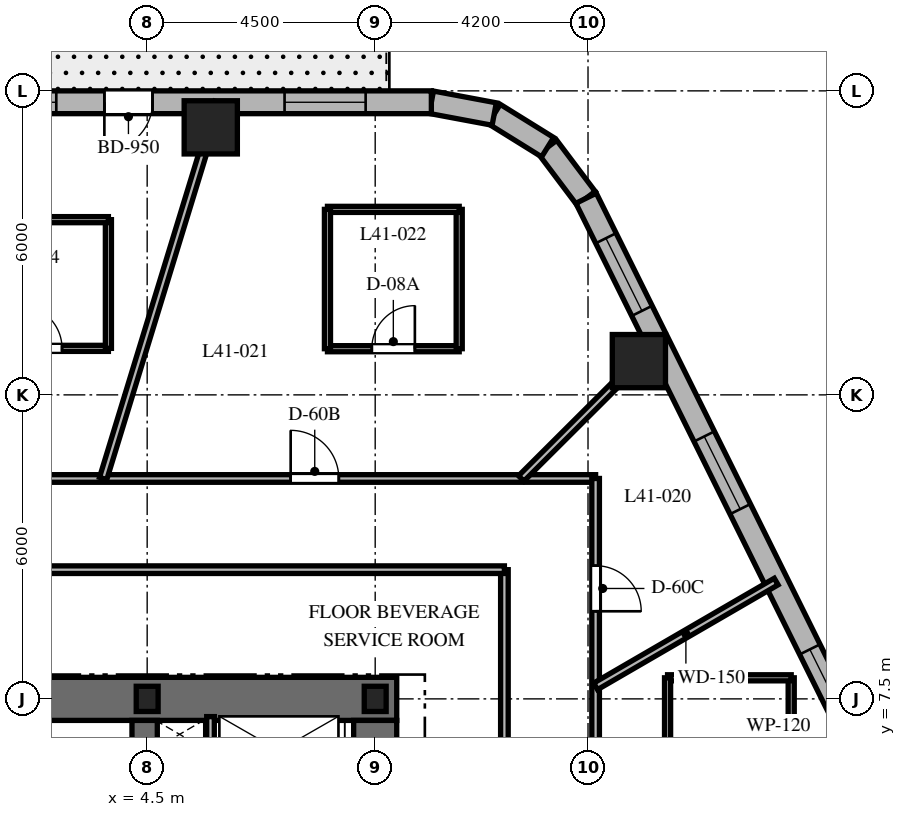
"""IFC4 building model, lengths in metres.
Left out: names, types, materials, properties, quantities, classifications, styles, units other than length and angle.
Written with IfcOpenShell. Run it as: python <this file> out.ifc"""

import sys

from ifc_helpers import new_model, si_unit, direction, frame, frame_2d, origin, origin_2d, place, context, subcontext, project, spatial, rectangle, i_section, extrude, element, fill, save


model = new_model("IFC4")
c1 = context("Model", 3, precision=1e-05, world=origin(), true_north=direction((0.0, 1.0)))
c2 = subcontext(c1, "Body", "Model", "MODEL_VIEW")
j1 = project(units=[si_unit("LENGTHUNIT", "METRE"), si_unit("PLANEANGLEUNIT", "RADIAN")], contexts=[c1])
p1 = place(None, origin())
s1 = spatial("IfcSite", under=j1, at=p1, CompositionType="ELEMENT")
p2 = place(p1, origin())
s2 = spatial("IfcBuilding", under=s1, at=p2, CompositionType="ELEMENT")
p3 = place(p2, frame((0.0, 0.0, 166.5)))
s3 = spatial("IfcBuildingStorey", under=s2, at=p3, CompositionType="ELEMENT", Elevation=166.5)
p4 = place(p3, frame((1.85, 7.5, 0.0), z_axis=(0.0, 0.0, 1.0), x_axis=(1.0, 0.0, 0.0)))
e1 = element("IfcWall", 1, at=p4, inside=s3, PredefinedType="SHEAR", context=c2, shape_type="SweptSolid", body=[
    extrude(rectangle(XDim=7.575, YDim=0.85, at=frame_2d((3.788, 0.0))), origin(), (0.0, 0.0, 1.0), 3.7),
])
p5 = place(p3, frame((9.0, -7.075, 0.0), z_axis=(0.0, 0.0, 1.0), x_axis=(0.0, 1.0, 0.0)))
e2 = element("IfcWall", 2, at=p5, inside=s3, PredefinedType="SHEAR", context=c2, shape_type="SweptSolid", body=[
    extrude(rectangle(XDim=14.15, YDim=0.85, at=frame_2d((7.075, 0.0))), origin(), (0.0, 0.0, 1.0), 3.7),
])
p6 = place(p5, frame((10.2, 0.0, 0.0)))
e3 = element("IfcOpeningElement", 3, at=p6, cuts=e2, PredefinedType="OPENING", context=c2, shape_type="SweptSolid", body=[
    extrude(rectangle(XDim=1.05, YDim=2.15, at=frame_2d((0.525, 1.075))), frame((0.0, 0.435, 0.0), z_axis=(0.0, -1.0, 0.0), x_axis=(1.0, 0.0, 0.0)), (0.0, 0.0, 1.0), 0.87),
])
p7 = place(p3, frame((4.45, 2.25, 0.0), z_axis=(0.0, 0.0, 1.0), x_axis=(0.0, 1.0, 0.0)))
e4 = element("IfcWall", 4, at=p7, inside=s3, PredefinedType="SHEAR", context=c2, shape_type="SweptSolid", body=[
    extrude(rectangle(XDim=4.825, YDim=0.5, at=frame_2d((2.413, 0.0))), origin(), (0.0, 0.0, 1.0), 3.7),
])
for number, where, z_axis, x_axis in (
    (5, (9.0, 7.5, 0.0), (0.0, 0.0, 1.0), (1.0, 0.0, 0.0)),
    (6, (4.5, 7.5, 0.0), (0.0, 0.0, 1.0), (1.0, 0.0, 0.0)),
):
    element("IfcColumn", number, at=place(p3, frame(where, z_axis=z_axis, x_axis=x_axis)), inside=s3, PredefinedType="COLUMN", context=c2, shape_type="SweptSolid", body=[
        extrude(i_section(OverallWidth=0.432, OverallDepth=0.498, WebThickness=0.056, FlangeThickness=0.089, at=origin_2d()), origin(), (0.0, 0.0, 1.0), 3.7),
    ])
for number, where, z_axis, x_axis in (
    (7, (14.204, 14.166, 0.0), (0.0, 0.0, 1.0), (1.0, 0.0, 0.0)),
    (8, (5.755, 18.78, 0.0), (0.0, 0.0, 1.0), (1.0, 0.0, 0.0)),
):
    element("IfcColumn", number, at=place(p3, frame(where, z_axis=z_axis, x_axis=x_axis)), inside=s3, PredefinedType="COLUMN", context=c2, shape_type="SweptSolid", body=[
        extrude(rectangle(XDim=1.05, YDim=1.05, at=origin_2d()), origin(), (0.0, 0.0, 1.0), 3.7),
    ])
p8 = place(p3, frame((13.162, 17.381, 0.0), z_axis=(0.0, 0.0, 1.0), x_axis=(-0.601515770517, 0.798860925205, 0.0)))
e9 = element("IfcWall", 9, at=p8, inside=s3, PredefinedType="SOLIDWALL", context=c2, shape_type="SweptSolid", body=[
    extrude(rectangle(XDim=1.262, YDim=0.45, at=frame_2d((0.631, 0.0))), origin(), (0.0, 0.0, 1.0), 3.38),
])
p9 = place(p3, frame((12.403, 18.389, 0.0), z_axis=(0.0, 0.0, 1.0), x_axis=(-0.849795170926, 0.527113049991, 0.0)))
e10 = element("IfcWall", 10, at=p9, inside=s3, PredefinedType="SOLIDWALL", context=c2, shape_type="SweptSolid", body=[
    extrude(rectangle(XDim=1.241, YDim=0.45, at=frame_2d((0.62, 0.0))), origin(), (0.0, 0.0, 1.0), 3.38),
])
p10 = place(p3, frame((11.349, 19.043, 0.0), z_axis=(0.0, 0.0, 1.0), x_axis=(-0.982931267051, 0.183973161772, 0.0)))
e11 = element("IfcWall", 11, at=p10, inside=s3, PredefinedType="SOLIDWALL", context=c2, shape_type="SweptSolid", body=[
    extrude(rectangle(XDim=1.262, YDim=0.45, at=frame_2d((0.631, 0.0))), origin(), (0.0, 0.0, 1.0), 3.38),
])
p11 = place(p3, frame((20.618, 2.344, 0.0), z_axis=(0.0, 0.0, 1.0), x_axis=(-0.444243691097, 0.895905990002, 0.0)))
e12 = element("IfcWall", 12, at=p11, inside=s3, PredefinedType="SOLIDWALL", context=c2, shape_type="SweptSolid", body=[
    extrude(rectangle(XDim=16.784, YDim=0.45, at=frame_2d((8.392, 0.0))), origin(), (0.0, 0.0, 1.0), 3.38),
])
p12 = place(p11, frame((5.245, 0.0, 0.8)))
e13 = element("IfcOpeningElement", 13, at=p12, cuts=e12, PredefinedType="OPENING", context=c2, shape_type="SweptSolid", body=[
    extrude(rectangle(XDim=1.6, YDim=1.75, at=frame_2d((0.8, 0.875))), frame((0.0, 0.235, 0.0), z_axis=(0.0, -1.0, 0.0), x_axis=(1.0, 0.0, 0.0)), (0.0, 0.0, 1.0), 0.47),
])
p13 = place(p11, frame((9.936, 0.0, 0.8)))
e14 = element("IfcOpeningElement", 14, at=p13, cuts=e12, PredefinedType="OPENING", context=c2, shape_type="SweptSolid", body=[
    extrude(rectangle(XDim=1.6, YDim=1.75, at=frame_2d((0.8, 0.875))), frame((0.0, 0.235, 0.0), z_axis=(0.0, -1.0, 0.0), x_axis=(1.0, 0.0, 0.0)), (0.0, 0.0, 1.0), 0.47),
])
p14 = place(p11, frame((14.303, 0.0, 0.8)))
e15 = element("IfcOpeningElement", 15, at=p14, cuts=e12, PredefinedType="OPENING", context=c2, shape_type="SweptSolid", body=[
    extrude(rectangle(XDim=1.6, YDim=1.75, at=frame_2d((0.8, 0.875))), frame((0.0, 0.235, 0.0), z_axis=(0.0, -1.0, 0.0), x_axis=(1.0, 0.0, 0.0)), (0.0, 0.0, 1.0), 0.47),
])
p15 = place(p11, frame((0.931, 0.0, 0.8)))
e16 = element("IfcOpeningElement", 16, at=p15, cuts=e12, PredefinedType="OPENING", context=c2, shape_type="SweptSolid", body=[
    extrude(rectangle(XDim=1.6, YDim=1.75, at=frame_2d((0.8, 0.875))), frame((0.0, 0.235, 0.0), z_axis=(0.0, -1.0, 0.0), x_axis=(1.0, 0.0, 0.0)), (0.0, 0.0, 1.0), 0.47),
])
p16 = place(p3, frame((10.108, 19.275, 0.0), z_axis=(0.0, 0.0, 1.0), x_axis=(-1.0, 0.0, 0.0)))
e17 = element("IfcWall", 17, at=p16, inside=s3, PredefinedType="SOLIDWALL", context=c2, shape_type="SweptSolid", body=[
    extrude(rectangle(XDim=21.829, YDim=0.45, at=frame_2d((10.915, 0.0))), origin(), (0.0, 0.0, 1.0), 3.38),
])
p17 = place(p16, frame((5.503, 0.0, 0.0)))
e18 = element("IfcOpeningElement", 18, at=p17, cuts=e17, PredefinedType="OPENING", context=c2, shape_type="SweptSolid", body=[
    extrude(rectangle(XDim=0.95, YDim=2.15, at=frame_2d((0.475, 1.075))), frame((0.0, 0.235, 0.0), z_axis=(0.0, -1.0, 0.0), x_axis=(1.0, 0.0, 0.0)), (0.0, 0.0, 1.0), 0.47),
])
p18 = place(p16, frame((1.297, 0.0, 0.8)))
e19 = element("IfcOpeningElement", 19, at=p18, cuts=e17, PredefinedType="OPENING", context=c2, shape_type="SweptSolid", body=[
    extrude(rectangle(XDim=1.6, YDim=1.75, at=frame_2d((0.8, 0.875))), frame((0.0, 0.235, 0.0), z_axis=(0.0, -1.0, 0.0), x_axis=(1.0, 0.0, 0.0)), (0.0, 0.0, 1.0), 0.47),
])
p19 = place(p16, frame((7.402, 0.0, 0.8)))
e20 = element("IfcOpeningElement", 20, at=p19, cuts=e17, PredefinedType="OPENING", context=c2, shape_type="SweptSolid", body=[
    extrude(rectangle(XDim=1.6, YDim=1.75, at=frame_2d((0.8, 0.875))), frame((0.0, 0.235, 0.0), z_axis=(0.0, -1.0, 0.0), x_axis=(1.0, 0.0, 0.0)), (0.0, 0.0, 1.0), 0.47),
])
p20 = place(p16, frame((12.684, 0.0, 0.8)))
e21 = element("IfcOpeningElement", 21, at=p20, cuts=e17, PredefinedType="OPENING", context=c2, shape_type="SweptSolid", body=[
    extrude(rectangle(XDim=1.6, YDim=1.75, at=frame_2d((0.8, 0.875))), frame((0.0, 0.235, 0.0), z_axis=(0.0, -1.0, 0.0), x_axis=(1.0, 0.0, 0.0)), (0.0, 0.0, 1.0), 0.47),
])
p21 = place(p16, frame((18.933, 0.0, 0.8)))
e22 = element("IfcOpeningElement", 22, at=p21, cuts=e17, PredefinedType="OPENING", context=c2, shape_type="SweptSolid", body=[
    extrude(rectangle(XDim=1.6, YDim=1.75, at=frame_2d((0.8, 0.875))), frame((0.0, 0.235, 0.0), z_axis=(0.0, -1.0, 0.0), x_axis=(1.0, 0.0, 0.0)), (0.0, 0.0, 1.0), 0.47),
])
p22 = place(p3, frame((5.75, 5.74, 0.0), z_axis=(0.0, 0.0, 1.0), x_axis=(0.0, 1.0, 0.0)))
e23 = element("IfcWall", 23, at=p22, inside=s3, PredefinedType="PARTITIONING", context=c2, shape_type="SweptSolid", body=[
    extrude(rectangle(XDim=1.41, YDim=0.15, at=frame_2d((0.705, 0.0))), origin(), (0.0, 0.0, 1.0), 3.38),
])
p23 = place(p3, frame((-13.35, 11.85, 0.0), z_axis=(0.0, 0.0, 1.0), x_axis=(1.0, 0.0, 0.0)))
e24 = element("IfcWall", 24, at=p23, inside=s3, PredefinedType="PARTITIONING", context=c2, shape_type="SweptSolid", body=[
    extrude(rectangle(XDim=26.7, YDim=0.15, at=frame_2d((13.35, 0.0))), origin(), (0.0, 0.0, 1.0), 2.82),
])
p24 = place(p23, frame((20.682, 0.0, 0.0)))
e25 = element("IfcOpeningElement", 25, at=p24, cuts=e24, PredefinedType="OPENING", context=c2, shape_type="SweptSolid", body=[
    extrude(rectangle(XDim=0.95, YDim=2.03, at=frame_2d((0.475, 1.015))), frame((0.0, 0.085, 0.0), z_axis=(0.0, -1.0, 0.0), x_axis=(1.0, 0.0, 0.0)), (0.0, 0.0, 1.0), 0.17),
])
p25 = place(p23, frame((14.708, 0.0, 0.0)))
e26 = element("IfcOpeningElement", 26, at=p25, cuts=e24, PredefinedType="OPENING", context=c2, shape_type="SweptSolid", body=[
    extrude(rectangle(XDim=0.95, YDim=2.03, at=frame_2d((0.475, 1.015))), frame((0.0, 0.085, 0.0), z_axis=(0.0, -1.0, 0.0), x_axis=(1.0, 0.0, 0.0)), (0.0, 0.0, 1.0), 0.17),
])
p26 = place(p23, frame((10.553, 0.0, 0.0)))
e27 = element("IfcOpeningElement", 27, at=p26, cuts=e24, PredefinedType="OPENING", context=c2, shape_type="SweptSolid", body=[
    extrude(rectangle(XDim=0.95, YDim=2.03, at=frame_2d((0.475, 1.015))), frame((0.0, 0.085, 0.0), z_axis=(0.0, -1.0, 0.0), x_axis=(1.0, 0.0, 0.0)), (0.0, 0.0, 1.0), 0.17),
])
p27 = place(p23, frame((3.995, 0.0, 0.0)))
e28 = element("IfcOpeningElement", 28, at=p27, cuts=e24, PredefinedType="OPENING", context=c2, shape_type="SweptSolid", body=[
    extrude(rectangle(XDim=0.95, YDim=2.03, at=frame_2d((0.475, 1.015))), frame((0.0, 0.085, 0.0), z_axis=(0.0, -1.0, 0.0), x_axis=(1.0, 0.0, 0.0)), (0.0, 0.0, 1.0), 0.17),
])
p28 = place(p3, frame((13.35, 11.85, 0.0), z_axis=(0.0, 0.0, 1.0), x_axis=(0.0, -1.0, 0.0)))
e29 = element("IfcWall", 29, at=p28, inside=s3, PredefinedType="PARTITIONING", context=c2, shape_type="SweptSolid", body=[
    extrude(rectangle(XDim=23.7, YDim=0.15, at=frame_2d((11.85, 0.0))), origin(), (0.0, 0.0, 1.0), 2.82),
])
p29 = place(p28, frame((5.652, 0.0, 0.0)))
e30 = element("IfcOpeningElement", 30, at=p29, cuts=e29, PredefinedType="OPENING", context=c2, shape_type="SweptSolid", body=[
    extrude(rectangle(XDim=0.95, YDim=2.03, at=frame_2d((0.475, 1.015))), frame((0.0, 0.085, 0.0), z_axis=(0.0, -1.0, 0.0), x_axis=(1.0, 0.0, 0.0)), (0.0, 0.0, 1.0), 0.17),
])
p30 = place(p28, frame((1.721, 0.0, 0.0)))
e31 = element("IfcOpeningElement", 31, at=p30, cuts=e29, PredefinedType="OPENING", context=c2, shape_type="SweptSolid", body=[
    extrude(rectangle(XDim=0.9, YDim=2.03, at=frame_2d((0.45, 1.015))), frame((0.0, 0.085, 0.0), z_axis=(0.0, -1.0, 0.0), x_axis=(1.0, 0.0, 0.0)), (0.0, 0.0, 1.0), 0.17),
])
p31 = place(p28, frame((18.389, 0.0, 0.0)))
e32 = element("IfcOpeningElement", 32, at=p31, cuts=e29, PredefinedType="OPENING", context=c2, shape_type="SweptSolid", body=[
    extrude(rectangle(XDim=0.95, YDim=2.03, at=frame_2d((0.475, 1.015))), frame((0.0, 0.085, 0.0), z_axis=(0.0, -1.0, 0.0), x_axis=(1.0, 0.0, 0.0)), (0.0, 0.0, 1.0), 0.17),
])
p32 = place(p28, frame((10.751, 0.0, 0.0)))
e33 = element("IfcOpeningElement", 33, at=p32, cuts=e29, PredefinedType="OPENING", context=c2, shape_type="SweptSolid", body=[
    extrude(rectangle(XDim=0.95, YDim=2.03, at=frame_2d((0.475, 1.015))), frame((0.0, 0.085, 0.0), z_axis=(0.0, -1.0, 0.0), x_axis=(1.0, 0.0, 0.0)), (0.0, 0.0, 1.0), 0.17),
])
p33 = place(p3, frame((11.55, 4.6, 0.0), z_axis=(0.0, 0.0, 1.0), x_axis=(0.0, 1.0, 0.0)))
e34 = element("IfcWall", 34, at=p33, inside=s3, PredefinedType="PARTITIONING", context=c2, shape_type="SweptSolid", body=[
    extrude(rectangle(XDim=5.45, YDim=0.15, at=frame_2d((2.725, 0.0))), origin(), (0.0, 0.0, 1.0), 2.82),
])
p34 = place(p3, frame((11.55, 10.05, 0.0), z_axis=(0.0, 0.0, 1.0), x_axis=(-1.0, 0.0, 0.0)))
e35 = element("IfcWall", 35, at=p34, inside=s3, PredefinedType="PARTITIONING", context=c2, shape_type="SweptSolid", body=[
    extrude(rectangle(XDim=9.65, YDim=0.15, at=frame_2d((4.825, 0.0))), origin(), (0.0, 0.0, 1.0), 2.82),
])
p35 = place(p3, frame((13.35, 7.748, 0.0), z_axis=(0.0, 0.0, 1.0), x_axis=(0.864894342526, 0.501953958313, 0.0)))
e36 = element("IfcWall", 36, at=p35, inside=s3, PredefinedType="PARTITIONING", context=c2, shape_type="SweptSolid", body=[
    extrude(rectangle(XDim=4.12, YDim=0.15, at=frame_2d((2.06, 0.0))), origin(), (0.0, 0.0, 1.0), 2.62),
])
p36 = place(p3, frame((11.882, 11.85, 0.0), z_axis=(0.0, 0.0, 1.0), x_axis=(0.708037373639, 0.706174962407, 0.0)))
e37 = element("IfcWall", 37, at=p36, inside=s3, PredefinedType="PARTITIONING", context=c2, shape_type="SweptSolid", body=[
    extrude(rectangle(XDim=3.802, YDim=0.15, at=frame_2d((1.901, 0.0))), origin(), (0.0, 0.0, 1.0), 2.62),
])
p37 = place(p3, frame((3.631, 11.85, 0.0), z_axis=(0.0, 0.0, 1.0), x_axis=(0.293007573338, 0.956110120209, 0.0)))
e38 = element("IfcWall", 38, at=p37, inside=s3, PredefinedType="PARTITIONING", context=c2, shape_type="SweptSolid", body=[
    extrude(rectangle(XDim=7.766, YDim=0.15, at=frame_2d((3.883, 0.0))), origin(), (0.0, 0.0, 1.0), 2.62),
])
p38 = place(p3, frame((17.21, 5.306, 0.0), z_axis=(0.0, 0.0, 1.0), x_axis=(0.0, 1.0, 0.0)))
e39 = element("IfcWall", 39, at=p38, inside=s3, PredefinedType="PARTITIONING", context=c2, shape_type="SweptSolid", body=[
    extrude(rectangle(XDim=2.61, YDim=0.12, at=frame_2d((1.305, 0.0))), origin(), (0.0, 0.0, 1.0), 2.62),
])
p39 = place(p3, frame((17.21, 7.916, 0.0), z_axis=(0.0, 0.0, 1.0), x_axis=(-1.0, 0.0, 0.0)))
e40 = element("IfcWall", 40, at=p39, inside=s3, PredefinedType="PARTITIONING", context=c2, shape_type="SweptSolid", body=[
    extrude(rectangle(XDim=2.44, YDim=0.12, at=frame_2d((1.22, 0.0))), origin(), (0.0, 0.0, 1.0), 2.62),
])
p40 = place(p3, frame((14.77, 7.916, 0.0), z_axis=(0.0, 0.0, 1.0), x_axis=(0.0, -1.0, 0.0)))
e41 = element("IfcWall", 41, at=p40, inside=s3, PredefinedType="PARTITIONING", context=c2, shape_type="SweptSolid", body=[
    extrude(rectangle(XDim=2.61, YDim=0.12, at=frame_2d((1.305, 0.0))), origin(), (0.0, 0.0, 1.0), 2.82),
])
p41 = place(p3, frame((8.058, 14.411, 0.0), z_axis=(0.0, 0.0, 1.0), x_axis=(1.0, 0.0, 0.0)))
e42 = element("IfcWall", 42, at=p41, inside=s3, PredefinedType="PARTITIONING", context=c2, shape_type="SweptSolid", body=[
    extrude(rectangle(XDim=2.6, YDim=0.12, at=frame_2d((1.3, 0.0))), origin(), (0.0, 0.0, 1.0), 3.38),
])
p42 = place(p41, frame((0.875, 0.0, 0.0)))
e43 = element("IfcOpeningElement", 43, at=p42, cuts=e42, PredefinedType="OPENING", context=c2, shape_type="SweptSolid", body=[
    extrude(rectangle(XDim=0.85, YDim=2.03, at=frame_2d((0.425, 1.015))), frame((0.0, 0.07, 0.0), z_axis=(0.0, -1.0, 0.0), x_axis=(1.0, 0.0, 0.0)), (0.0, 0.0, 1.0), 0.14),
])
p43 = place(p3, frame((10.658, 14.411, 0.0), z_axis=(0.0, 0.0, 1.0), x_axis=(0.0, 1.0, 0.0)))
e44 = element("IfcWall", 44, at=p43, inside=s3, PredefinedType="PARTITIONING", context=c2, shape_type="SweptSolid", body=[
    extrude(rectangle(XDim=2.75, YDim=0.12, at=frame_2d((1.375, 0.0))), origin(), (0.0, 0.0, 1.0), 2.62),
])
p44 = place(p3, frame((10.658, 17.161, 0.0), z_axis=(0.0, 0.0, 1.0), x_axis=(-1.0, 0.0, 0.0)))
e45 = element("IfcWall", 45, at=p44, inside=s3, PredefinedType="PARTITIONING", context=c2, shape_type="SweptSolid", body=[
    extrude(rectangle(XDim=2.6, YDim=0.12, at=frame_2d((1.3, 0.0))), origin(), (0.0, 0.0, 1.0), 2.62),
])
p45 = place(p3, frame((8.058, 17.161, 0.0), z_axis=(0.0, 0.0, 1.0), x_axis=(0.0, -1.0, 0.0)))
e46 = element("IfcWall", 46, at=p45, inside=s3, PredefinedType="PARTITIONING", context=c2, shape_type="SweptSolid", body=[
    extrude(rectangle(XDim=2.75, YDim=0.12, at=frame_2d((1.375, 0.0))), origin(), (0.0, 0.0, 1.0), 3.38),
])
p46 = place(p3, frame((1.055, 14.418, 0.0), z_axis=(0.0, 0.0, 1.0), x_axis=(1.0, 0.0, 0.0)))
e47 = element("IfcWall", 47, at=p46, inside=s3, PredefinedType="PARTITIONING", context=c2, shape_type="SweptSolid", body=[
    extrude(rectangle(XDim=2.68, YDim=0.12, at=frame_2d((1.34, 0.0))), origin(), (0.0, 0.0, 1.0), 3.38),
])
p47 = place(p46, frame((0.915, 0.0, 0.0)))
e48 = element("IfcOpeningElement", 48, at=p47, cuts=e47, PredefinedType="OPENING", context=c2, shape_type="SweptSolid", body=[
    extrude(rectangle(XDim=0.85, YDim=2.03, at=frame_2d((0.425, 1.015))), frame((0.0, 0.07, 0.0), z_axis=(0.0, -1.0, 0.0), x_axis=(1.0, 0.0, 0.0)), (0.0, 0.0, 1.0), 0.14),
])
p48 = place(p3, frame((3.735, 14.418, 0.0), z_axis=(0.0, 0.0, 1.0), x_axis=(0.0, 1.0, 0.0)))
e49 = element("IfcWall", 49, at=p48, inside=s3, PredefinedType="PARTITIONING", context=c2, shape_type="SweptSolid", body=[
    extrude(rectangle(XDim=2.54, YDim=0.12, at=frame_2d((1.27, 0.0))), origin(), (0.0, 0.0, 1.0), 2.82),
])
p49 = place(p3, frame((3.735, 16.958, 0.0), z_axis=(0.0, 0.0, 1.0), x_axis=(-1.0, 0.0, 0.0)))
e50 = element("IfcWall", 50, at=p49, inside=s3, PredefinedType="PARTITIONING", context=c2, shape_type="SweptSolid", body=[
    extrude(rectangle(XDim=2.68, YDim=0.12, at=frame_2d((1.34, 0.0))), origin(), (0.0, 0.0, 1.0), 3.38),
])
p50 = place(p12, origin())
e51 = element("IfcWindow", 51, at=p50, inside=s3, PartitioningType="SINGLE_PANEL", PredefinedType="WINDOW", context=c2, shape_type="SweptSolid", body=[
    extrude(rectangle(XDim=1.6, YDim=1.75, at=frame_2d((0.8, 0.875))), frame((0.0, 0.03, 0.0), z_axis=(0.0, -1.0, 0.0), x_axis=(1.0, 0.0, 0.0)), (0.0, 0.0, 1.0), 0.06),
])
fill(e13, e51)
p51 = place(p13, origin())
e52 = element("IfcWindow", 52, at=p51, inside=s3, PartitioningType="SINGLE_PANEL", PredefinedType="WINDOW", context=c2, shape_type="SweptSolid", body=[
    extrude(rectangle(XDim=1.6, YDim=1.75, at=frame_2d((0.8, 0.875))), frame((0.0, 0.03, 0.0), z_axis=(0.0, -1.0, 0.0), x_axis=(1.0, 0.0, 0.0)), (0.0, 0.0, 1.0), 0.06),
])
fill(e14, e52)
p52 = place(p14, origin())
e53 = element("IfcWindow", 53, at=p52, inside=s3, PartitioningType="SINGLE_PANEL", PredefinedType="WINDOW", context=c2, shape_type="SweptSolid", body=[
    extrude(rectangle(XDim=1.6, YDim=1.75, at=frame_2d((0.8, 0.875))), frame((0.0, 0.03, 0.0), z_axis=(0.0, -1.0, 0.0), x_axis=(1.0, 0.0, 0.0)), (0.0, 0.0, 1.0), 0.06),
])
fill(e15, e53)
p53 = place(p17, origin())
e54 = element("IfcDoor", 54, at=p53, inside=s3, OperationType="SINGLE_SWING_RIGHT", PredefinedType="DOOR", context=c2, shape_type="SweptSolid", body=[
    extrude(rectangle(XDim=0.95, YDim=2.15, at=frame_2d((0.475, 1.075))), frame((0.0, 0.025, 0.0), z_axis=(0.0, -1.0, 0.0), x_axis=(1.0, 0.0, 0.0)), (0.0, 0.0, 1.0), 0.05),
])
fill(e18, e54)
p54 = place(p18, origin())
e55 = element("IfcWindow", 55, at=p54, inside=s3, PartitioningType="SINGLE_PANEL", PredefinedType="WINDOW", context=c2, shape_type="SweptSolid", body=[
    extrude(rectangle(XDim=1.6, YDim=1.75, at=frame_2d((0.8, 0.875))), frame((0.0, 0.03, 0.0), z_axis=(0.0, -1.0, 0.0), x_axis=(1.0, 0.0, 0.0)), (0.0, 0.0, 1.0), 0.06),
])
fill(e19, e55)
p55 = place(p19, origin())
e56 = element("IfcWindow", 56, at=p55, inside=s3, PartitioningType="SINGLE_PANEL", PredefinedType="WINDOW", context=c2, shape_type="SweptSolid", body=[
    extrude(rectangle(XDim=1.6, YDim=1.75, at=frame_2d((0.8, 0.875))), frame((0.0, 0.03, 0.0), z_axis=(0.0, -1.0, 0.0), x_axis=(1.0, 0.0, 0.0)), (0.0, 0.0, 1.0), 0.06),
])
fill(e20, e56)
p56 = place(p30, origin())
e57 = element("IfcDoor", 57, at=p56, inside=s3, OperationType="SINGLE_SWING_RIGHT", PredefinedType="DOOR", context=c2, shape_type="SweptSolid", body=[
    extrude(rectangle(XDim=0.9, YDim=2.03, at=frame_2d((0.45, 1.015))), frame((0.0, 0.025, 0.0), z_axis=(0.0, -1.0, 0.0), x_axis=(1.0, 0.0, 0.0)), (0.0, 0.0, 1.0), 0.05),
])
fill(e31, e57)
p57 = place(p24, origin())
e58 = element("IfcDoor", 58, at=p57, inside=s3, OperationType="SINGLE_SWING_LEFT", PredefinedType="DOOR", context=c2, shape_type="SweptSolid", body=[
    extrude(rectangle(XDim=0.95, YDim=2.03, at=frame_2d((0.475, 1.015))), frame((0.0, 0.025, 0.0), z_axis=(0.0, -1.0, 0.0), x_axis=(1.0, 0.0, 0.0)), (0.0, 0.0, 1.0), 0.05),
])
fill(e25, e58)
p58 = place(p42, origin())
e59 = element("IfcDoor", 59, at=p58, inside=s3, OperationType="SINGLE_SWING_RIGHT", PredefinedType="DOOR", context=c2, shape_type="SweptSolid", body=[
    extrude(rectangle(XDim=0.85, YDim=2.03, at=frame_2d((0.425, 1.015))), frame((0.0, 0.025, 0.0), z_axis=(0.0, -1.0, 0.0), x_axis=(1.0, 0.0, 0.0)), (0.0, 0.0, 1.0), 0.05),
])
fill(e43, e59)
p59 = place(p47, origin())
e60 = element("IfcDoor", 60, at=p59, inside=s3, OperationType="SINGLE_SWING_LEFT", PredefinedType="DOOR", context=c2, shape_type="SweptSolid", body=[
    extrude(rectangle(XDim=0.85, YDim=2.03, at=frame_2d((0.425, 1.015))), frame((0.0, 0.025, 0.0), z_axis=(0.0, -1.0, 0.0), x_axis=(1.0, 0.0, 0.0)), (0.0, 0.0, 1.0), 0.05),
])
fill(e48, e60)
save(model, sys.argv[1])
